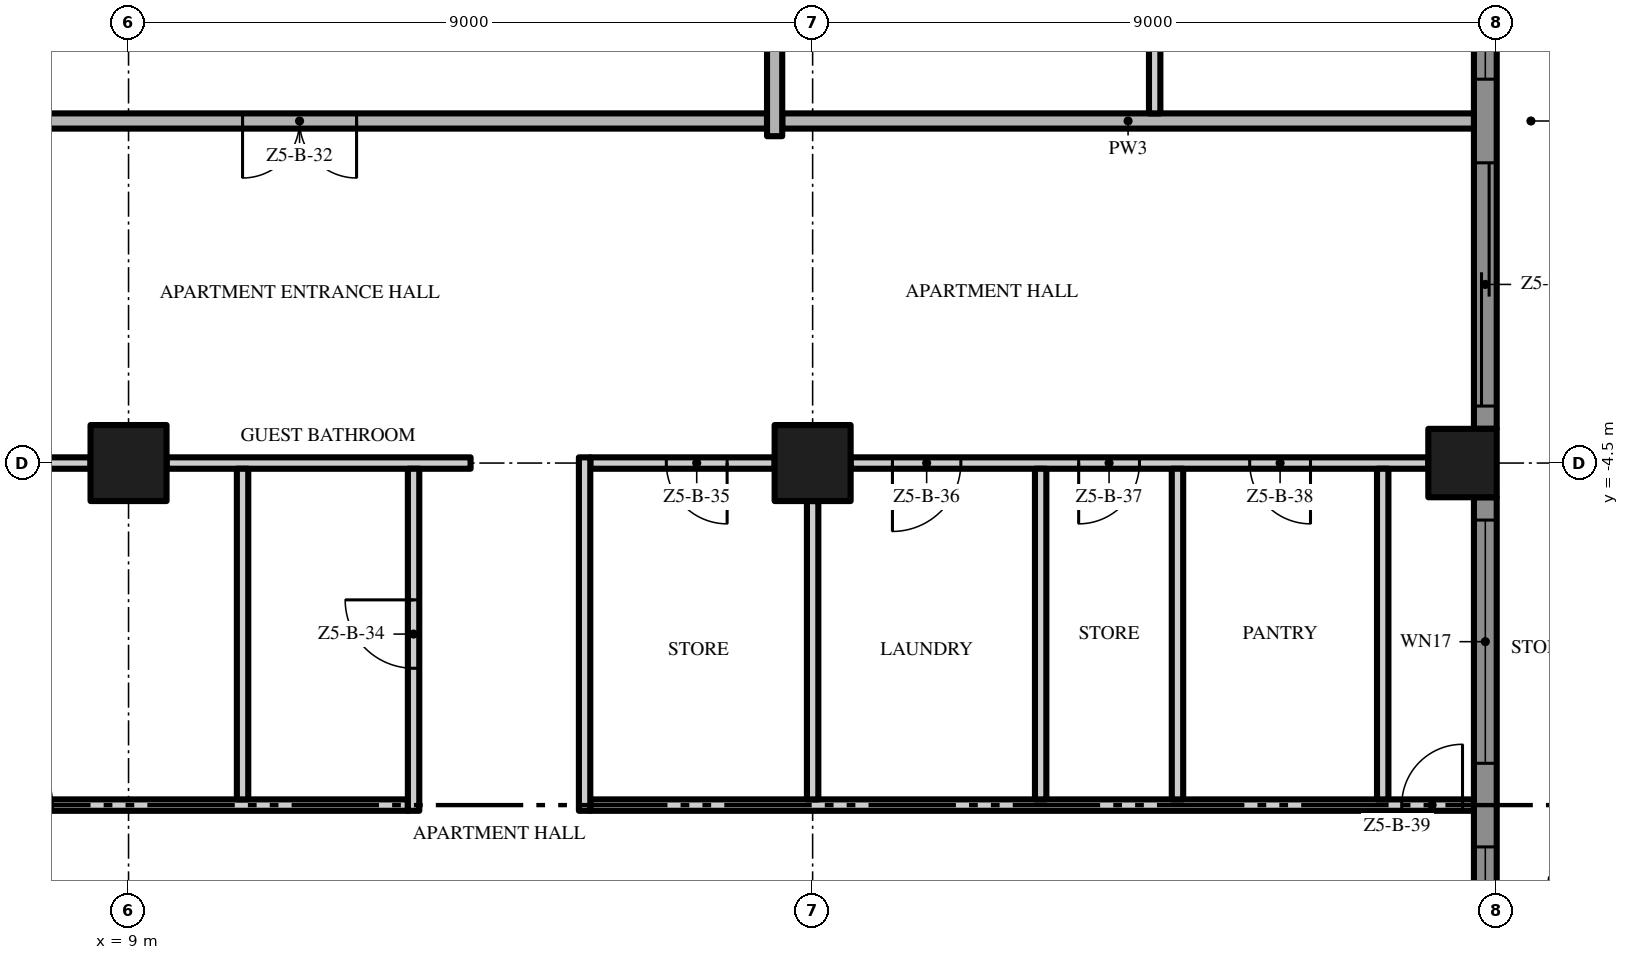
"""IFC4 building model, lengths in metres.
Left out: names, types, materials, properties, quantities, classifications, styles, units other than length and angle.
Written with IfcOpenShell. Run it as: python <this file> out.ifc"""

import sys

from ifc_helpers import new_model, si_unit, direction, frame, frame_2d, origin, origin_2d, place, context, subcontext, project, spatial, polyline, rectangle, outline, extrude, element, fill, save


model = new_model("IFC4")
c1 = context("Model", 3, precision=1e-05, world=origin(), true_north=direction((0.0, 1.0)))
c2 = subcontext(c1, "Body", "Model", "MODEL_VIEW")
j1 = project(units=[si_unit("LENGTHUNIT", "METRE"), si_unit("PLANEANGLEUNIT", "RADIAN")], contexts=[c1])
p1 = place(None, origin())
s1 = spatial("IfcSite", under=j1, at=p1, CompositionType="ELEMENT")
p2 = place(p1, origin())
s2 = spatial("IfcBuilding", under=s1, at=p2, CompositionType="ELEMENT")
p3 = place(p2, frame((0.0, 0.0, 250.2)))
s3 = spatial("IfcBuildingStorey", under=s2, at=p3, CompositionType="ELEMENT", Elevation=250.2)
p4 = place(p3, frame((18.0, -4.5, 0.0), z_axis=(0.0, 0.0, 1.0), x_axis=(1.0, 0.0, 0.0)))
e1 = element("IfcColumn", 1, at=p4, inside=s3, PredefinedType="COLUMN", context=c2, shape_type="SweptSolid", body=[
    extrude(rectangle(XDim=1.0, YDim=1.0, at=origin_2d()), origin(), (0.0, 0.0, 1.0), 3.5),
])
p5 = place(p3, frame((26.55, -4.5, 0.0), z_axis=(0.0, 0.0, 1.0), x_axis=(1.0, 0.0, 0.0)))
e2 = element("IfcColumn", 2, at=p5, inside=s3, PredefinedType="COLUMN", context=c2, shape_type="SweptSolid", body=[
    extrude(rectangle(XDim=0.9, YDim=0.9, at=origin_2d()), origin(), (0.0, 0.0, 1.0), 3.5),
])
p6 = place(p3, frame((9.0, -4.5, 0.0), z_axis=(0.0, 0.0, 1.0), x_axis=(1.0, 0.0, 0.0)))
e3 = element("IfcColumn", 3, at=p6, inside=s3, PredefinedType="COLUMN", context=c2, shape_type="SweptSolid", body=[
    extrude(rectangle(XDim=1.0, YDim=1.0, at=origin_2d()), origin(), (0.0, 0.0, 1.0), 3.5),
])
p7 = place(p3, frame((26.85, -4.95, 0.0), z_axis=(0.0, 0.0, 1.0), x_axis=(0.0, -1.0, 0.0)))
e4 = element("IfcWall", 4, at=p7, inside=s3, PredefinedType="SOLIDWALL", context=c2, shape_type="SweptSolid", body=[
    extrude(rectangle(XDim=8.1, YDim=0.3, at=frame_2d((4.05, 0.0))), origin(), (0.0, 0.0, 1.0), 3.5),
])
p8 = place(p7, frame((4.6, 0.0, 0.45)))
e5 = element("IfcOpeningElement", 5, at=p8, cuts=e4, PredefinedType="OPENING", context=c2, shape_type="SweptSolid", body=[
    extrude(rectangle(XDim=3.2, YDim=2.65, at=frame_2d((1.6, 1.325))), frame((0.0, 0.16, 0.0), z_axis=(0.0, -1.0, 0.0), x_axis=(1.0, 0.0, 0.0)), (0.0, 0.0, 1.0), 0.32),
])
p9 = place(p7, frame((0.3, 0.0, 0.45)))
e6 = element("IfcOpeningElement", 6, at=p9, cuts=e4, PredefinedType="OPENING", context=c2, shape_type="SweptSolid", body=[
    extrude(rectangle(XDim=3.2, YDim=2.65, at=frame_2d((1.6, 1.325))), frame((0.0, 0.16, 0.0), z_axis=(0.0, -1.0, 0.0), x_axis=(1.0, 0.0, 0.0)), (0.0, 0.0, 1.0), 0.32),
])
p10 = place(p3, frame((26.85, 4.05, 0.0), z_axis=(0.0, 0.0, 1.0), x_axis=(0.0, -1.0, 0.0)))
e7 = element("IfcWall", 7, at=p10, inside=s3, PredefinedType="SOLIDWALL", context=c2, shape_type="SweptSolid", body=[
    extrude(rectangle(XDim=8.1, YDim=0.3, at=frame_2d((4.05, 0.0))), origin(), (0.0, 0.0, 1.0), 3.5),
])
p11 = place(p10, frame((4.6, 0.0, 0.0)))
e8 = element("IfcOpeningElement", 8, at=p11, cuts=e7, PredefinedType="OPENING", context=c2, shape_type="SweptSolid", body=[
    extrude(rectangle(XDim=3.2, YDim=2.4, at=frame_2d((1.6, 1.2))), frame((0.0, 0.16, 0.0), z_axis=(0.0, -1.0, 0.0), x_axis=(1.0, 0.0, 0.0)), (0.0, 0.0, 1.0), 0.32),
])
p12 = place(p10, frame((0.3, 0.0, 0.45)))
e9 = element("IfcOpeningElement", 9, at=p12, cuts=e7, PredefinedType="OPENING", context=c2, shape_type="SweptSolid", body=[
    extrude(rectangle(XDim=3.2, YDim=2.65, at=frame_2d((1.6, 1.325))), frame((0.0, 0.16, 0.0), z_axis=(0.0, -1.0, 0.0), x_axis=(1.0, 0.0, 0.0)), (0.0, 0.0, 1.0), 0.32),
])
p13 = place(p3, origin())
e10 = element("IfcWall", 10, at=p13, inside=s3, PredefinedType="USERDEFINED", context=c2, shape_type="SweptSolid", body=[
    extrude(outline(polyline([(30.0, -18.0), (29.771, -16.5), (29.171, -15.0), (28.429, -13.5), (27.829, -12.0), (27.6, -10.5), (27.829, -9.0), (28.429, -7.5), (29.171, -6.0), (29.771, -4.5), (30.0, -3.0), (29.771, -1.5), (29.171, 0.0), (28.429, 1.5), (27.829, 3.0), (27.6, 4.5), (27.829, 6.0), (28.429, 7.5), (29.171, 9.0), (29.771, 10.5), (30.0, 12.0), (29.771, 13.5), (29.171, 15.0), (28.429, 16.5), (27.829, 18.0), (27.597, 17.907), (28.201, 16.398), (28.942, 14.898), (29.528, 13.434), (29.747, 12.0), (29.528, 10.566), (28.942, 9.102), (28.201, 7.602), (27.586, 6.066), (27.347, 4.5), (27.586, 2.934), (28.201, 1.398), (28.942, -0.102), (29.528, -1.566), (29.747, -3.0), (29.528, -4.434), (28.942, -5.898), (28.201, -7.398), (27.586, -8.934), (27.347, -10.5), (27.586, -12.066), (28.201, -13.602), (28.942, -15.102), (29.528, -16.566), (29.753, -18.038), (30.0, -18.0)])), origin(), (0.0, 0.0, 1.0), 0.9),
])
p14 = place(p3, frame((4.6, -9.0, 0.0), z_axis=(0.0, 0.0, 1.0), x_axis=(1.0, 0.0, 0.0)))
e11 = element("IfcWall", 11, at=p14, inside=s3, PredefinedType="PARTITIONING", context=c2, shape_type="SweptSolid", body=[
    extrude(rectangle(XDim=8.075, YDim=0.15, at=frame_2d((4.037, 0.0))), origin(), (0.0, 0.0, 1.0), 3.5),
])
p15 = place(p14, frame((2.4, 0.0, 0.0)))
e12 = element("IfcOpeningElement", 12, at=p15, cuts=e11, PredefinedType="OPENING", context=c2, shape_type="SweptSolid", body=[
    extrude(rectangle(XDim=1.0, YDim=2.4, at=frame_2d((0.5, 1.2))), frame((0.0, 0.085, 0.0), z_axis=(0.0, -1.0, 0.0), x_axis=(1.0, 0.0, 0.0)), (0.0, 0.0, 1.0), 0.17),
])
p16 = place(p3, frame((15.075, -9.0, 0.0), z_axis=(0.0, 0.0, 1.0), x_axis=(1.0, 0.0, 0.0)))
e13 = element("IfcWall", 13, at=p16, inside=s3, PredefinedType="PARTITIONING", context=c2, shape_type="SweptSolid", body=[
    extrude(rectangle(XDim=11.625, YDim=0.15, at=frame_2d((5.812, 0.0))), origin(), (0.0, 0.0, 1.0), 3.5),
])
p17 = place(p16, frame((10.675, 0.0, 0.0)))
e14 = element("IfcOpeningElement", 14, at=p17, cuts=e13, PredefinedType="OPENING", context=c2, shape_type="SweptSolid", body=[
    extrude(rectangle(XDim=0.8, YDim=2.0, at=frame_2d((0.4, 1.0))), frame((0.0, 0.085, 0.0), z_axis=(0.0, -1.0, 0.0), x_axis=(1.0, 0.0, 0.0)), (0.0, 0.0, 1.0), 0.17),
])
p18 = place(p3, frame((4.6, -4.5, 0.0), z_axis=(0.0, 0.0, 1.0), x_axis=(1.0, 0.0, 0.0)))
e15 = element("IfcWall", 15, at=p18, inside=s3, PredefinedType="PARTITIONING", context=c2, shape_type="SweptSolid", body=[
    extrude(rectangle(XDim=3.9, YDim=0.15, at=frame_2d((1.95, 0.0))), origin(), (0.0, 0.0, 1.0), 3.5),
])
p19 = place(p3, frame((9.5, -4.5, 0.0), z_axis=(0.0, 0.0, 1.0), x_axis=(1.0, 0.0, 0.0)))
e16 = element("IfcWall", 16, at=p19, inside=s3, PredefinedType="PARTITIONING", context=c2, shape_type="SweptSolid", body=[
    extrude(rectangle(XDim=4.0, YDim=0.15, at=frame_2d((2.0, 0.0))), origin(), (0.0, 0.0, 1.0), 3.5),
])
p20 = place(p3, frame((17.5, -4.5, 0.0), z_axis=(0.0, 0.0, 1.0), x_axis=(-1.0, 0.0, 0.0)))
e17 = element("IfcWall", 17, at=p20, inside=s3, PredefinedType="PARTITIONING", context=c2, shape_type="SweptSolid", body=[
    extrude(rectangle(XDim=2.425, YDim=0.15, at=frame_2d((1.212, 0.0))), origin(), (0.0, 0.0, 1.0), 3.5),
])
p21 = place(p20, frame((0.625, 0.0, 0.0)))
e18 = element("IfcOpeningElement", 18, at=p21, cuts=e17, PredefinedType="OPENING", context=c2, shape_type="SweptSolid", body=[
    extrude(rectangle(XDim=0.8, YDim=2.0, at=frame_2d((0.4, 1.0))), frame((0.0, 0.085, 0.0), z_axis=(0.0, -1.0, 0.0), x_axis=(1.0, 0.0, 0.0)), (0.0, 0.0, 1.0), 0.17),
])
p22 = place(p3, frame((26.1, -4.5, 0.0), z_axis=(0.0, 0.0, 1.0), x_axis=(-1.0, 0.0, 0.0)))
e19 = element("IfcWall", 19, at=p22, inside=s3, PredefinedType="PARTITIONING", context=c2, shape_type="SweptSolid", body=[
    extrude(rectangle(XDim=7.6, YDim=0.15, at=frame_2d((3.8, 0.0))), origin(), (0.0, 0.0, 1.0), 3.5),
])
p23 = place(p22, frame((6.15, 0.0, 0.0)))
e20 = element("IfcOpeningElement", 20, at=p23, cuts=e19, PredefinedType="OPENING", context=c2, shape_type="SweptSolid", body=[
    extrude(rectangle(XDim=0.9, YDim=2.1, at=frame_2d((0.45, 1.05))), frame((0.0, 0.085, 0.0), z_axis=(0.0, -1.0, 0.0), x_axis=(1.0, 0.0, 0.0)), (0.0, 0.0, 1.0), 0.17),
])
p24 = place(p22, frame((3.8, 0.0, 0.0)))
e21 = element("IfcOpeningElement", 21, at=p24, cuts=e19, PredefinedType="OPENING", context=c2, shape_type="SweptSolid", body=[
    extrude(rectangle(XDim=0.8, YDim=2.0, at=frame_2d((0.4, 1.0))), frame((0.0, 0.085, 0.0), z_axis=(0.0, -1.0, 0.0), x_axis=(1.0, 0.0, 0.0)), (0.0, 0.0, 1.0), 0.17),
])
p25 = place(p22, frame((1.55, 0.0, 0.0)))
e22 = element("IfcOpeningElement", 22, at=p25, cuts=e19, PredefinedType="OPENING", context=c2, shape_type="SweptSolid", body=[
    extrude(rectangle(XDim=0.8, YDim=2.0, at=frame_2d((0.4, 1.0))), frame((0.0, 0.085, 0.0), z_axis=(0.0, -1.0, 0.0), x_axis=(1.0, 0.0, 0.0)), (0.0, 0.0, 1.0), 0.17),
])
p26 = place(p3, frame((17.4, 0.0, 0.0), z_axis=(0.0, 0.0, 1.0), x_axis=(-1.0, 0.0, 0.0)))
e23 = element("IfcWall", 23, at=p26, inside=s3, PredefinedType="PARTITIONING", context=c2, shape_type="SweptSolid", body=[
    extrude(rectangle(XDim=34.8, YDim=0.2, at=frame_2d((17.4, 0.0))), origin(), (0.0, 0.0, 1.0), 3.5),
])
p27 = place(p26, frame((23.4, 0.0, 0.0)))
e24 = element("IfcOpeningElement", 24, at=p27, cuts=e23, PredefinedType="OPENING", context=c2, shape_type="SweptSolid", body=[
    extrude(rectangle(XDim=1.5, YDim=2.4, at=frame_2d((0.75, 1.2))), frame((0.0, 0.11, 0.0), z_axis=(0.0, -1.0, 0.0), x_axis=(1.0, 0.0, 0.0)), (0.0, 0.0, 1.0), 0.22),
])
p28 = place(p26, frame((5.4, 0.0, 0.0)))
e25 = element("IfcOpeningElement", 25, at=p28, cuts=e23, PredefinedType="OPENING", context=c2, shape_type="SweptSolid", body=[
    extrude(rectangle(XDim=1.5, YDim=2.4, at=frame_2d((0.75, 1.2))), frame((0.0, 0.11, 0.0), z_axis=(0.0, -1.0, 0.0), x_axis=(1.0, 0.0, 0.0)), (0.0, 0.0, 1.0), 0.22),
])
p29 = place(p3, frame((17.6, 0.0, 0.0), z_axis=(0.0, 0.0, 1.0), x_axis=(1.0, 0.0, 0.0)))
e26 = element("IfcWall", 26, at=p29, inside=s3, PredefinedType="PARTITIONING", context=c2, shape_type="SweptSolid", body=[
    extrude(rectangle(XDim=9.1, YDim=0.2, at=frame_2d((4.55, 0.0))), origin(), (0.0, 0.0, 1.0), 3.5),
])
p30 = place(p3, frame((10.5, -8.925, 0.0), z_axis=(0.0, 0.0, 1.0), x_axis=(0.0, 1.0, 0.0)))
e27 = element("IfcWall", 27, at=p30, inside=s3, PredefinedType="PARTITIONING", context=c2, shape_type="SweptSolid", body=[
    extrude(rectangle(XDim=4.35, YDim=0.15, at=frame_2d((2.175, 0.0))), origin(), (0.0, 0.0, 1.0), 3.5),
])
p31 = place(p3, frame((12.75, -9.075, 0.0), z_axis=(0.0, 0.0, 1.0), x_axis=(0.0, 1.0, 0.0)))
e28 = element("IfcWall", 28, at=p31, inside=s3, PredefinedType="PARTITIONING", context=c2, shape_type="SweptSolid", body=[
    extrude(rectangle(XDim=4.5, YDim=0.15, at=frame_2d((2.25, 0.0))), origin(), (0.0, 0.0, 1.0), 3.5),
])
p32 = place(p31, frame((1.875, 0.0, 0.0)))
e29 = element("IfcOpeningElement", 29, at=p32, cuts=e28, PredefinedType="OPENING", context=c2, shape_type="SweptSolid", body=[
    extrude(rectangle(XDim=0.9, YDim=2.1, at=frame_2d((0.45, 1.05))), frame((0.0, 0.085, 0.0), z_axis=(0.0, -1.0, 0.0), x_axis=(1.0, 0.0, 0.0)), (0.0, 0.0, 1.0), 0.17),
])
p33 = place(p3, frame((15.0, -9.075, 0.0), z_axis=(0.0, 0.0, 1.0), x_axis=(0.0, 1.0, 0.0)))
e30 = element("IfcWall", 30, at=p33, inside=s3, PredefinedType="PARTITIONING", context=c2, shape_type="SweptSolid", body=[
    extrude(rectangle(XDim=4.65, YDim=0.15, at=frame_2d((2.325, 0.0))), origin(), (0.0, 0.0, 1.0), 3.5),
])
p34 = place(p3, frame((17.5, -0.2, 0.0), z_axis=(0.0, 0.0, 1.0), x_axis=(0.0, 1.0, 0.0)))
e31 = element("IfcWall", 31, at=p34, inside=s3, PredefinedType="PARTITIONING", context=c2, shape_type="SweptSolid", body=[
    extrude(rectangle(XDim=4.2, YDim=0.2, at=frame_2d((2.1, 0.0))), origin(), (0.0, 0.0, 1.0), 3.5),
])
p35 = place(p3, frame((18.0, -8.925, 0.0), z_axis=(0.0, 0.0, 1.0), x_axis=(0.0, 1.0, 0.0)))
e32 = element("IfcWall", 32, at=p35, inside=s3, PredefinedType="PARTITIONING", context=c2, shape_type="SweptSolid", body=[
    extrude(rectangle(XDim=3.925, YDim=0.15, at=frame_2d((1.962, 0.0))), origin(), (0.0, 0.0, 1.0), 3.5),
])
p36 = place(p3, frame((21.0, -8.925, 0.0), z_axis=(0.0, 0.0, 1.0), x_axis=(0.0, 1.0, 0.0)))
e33 = element("IfcWall", 33, at=p36, inside=s3, PredefinedType="PARTITIONING", context=c2, shape_type="SweptSolid", body=[
    extrude(rectangle(XDim=4.35, YDim=0.15, at=frame_2d((2.175, 0.0))), origin(), (0.0, 0.0, 1.0), 3.5),
])
p37 = place(p3, frame((22.5, 17.55, 0.0), z_axis=(0.0, 0.0, 1.0), x_axis=(0.0, -1.0, 0.0)))
e34 = element("IfcWall", 34, at=p37, inside=s3, PredefinedType="PARTITIONING", context=c2, shape_type="SweptSolid", body=[
    extrude(rectangle(XDim=17.45, YDim=0.15, at=frame_2d((8.725, 0.0))), origin(), (0.0, 0.0, 1.0), 3.5),
])
p38 = place(p37, frame((14.8, 0.0, 0.0)))
e35 = element("IfcOpeningElement", 35, at=p38, cuts=e34, PredefinedType="OPENING", context=c2, shape_type="SweptSolid", body=[
    extrude(rectangle(XDim=1.0, YDim=2.4, at=frame_2d((0.5, 1.2))), frame((0.0, 0.085, 0.0), z_axis=(0.0, -1.0, 0.0), x_axis=(1.0, 0.0, 0.0)), (0.0, 0.0, 1.0), 0.17),
])
p39 = place(p37, frame((7.65, 0.0, 0.0)))
e36 = element("IfcOpeningElement", 36, at=p39, cuts=e34, PredefinedType="OPENING", context=c2, shape_type="SweptSolid", body=[
    extrude(rectangle(XDim=1.8, YDim=2.4, at=frame_2d((0.9, 1.2))), frame((0.0, 0.085, 0.0), z_axis=(0.0, -1.0, 0.0), x_axis=(1.0, 0.0, 0.0)), (0.0, 0.0, 1.0), 0.17),
])
for number, where, z_axis, x_axis in (
    (37, (22.8, -8.925, 0.0), (0.0, 0.0, 1.0), (0.0, 1.0, 0.0)),
    (38, (25.5, -8.925, 0.0), (0.0, 0.0, 1.0), (0.0, 1.0, 0.0)),
):
    element("IfcWall", number, at=place(p3, frame(where, z_axis=z_axis, x_axis=x_axis)), inside=s3, PredefinedType="PARTITIONING", context=c2, shape_type="SweptSolid", body=[
        extrude(rectangle(XDim=4.35, YDim=0.15, at=frame_2d((2.175, 0.0))), origin(), (0.0, 0.0, 1.0), 3.5),
    ])
p40 = place(p8, origin())
e39 = element("IfcWindow", 39, at=p40, inside=s3, PartitioningType="SINGLE_PANEL", PredefinedType="WINDOW", context=c2, shape_type="SweptSolid", body=[
    extrude(rectangle(XDim=3.2, YDim=2.65, at=frame_2d((1.6, 1.325))), frame((0.0, 0.03, 0.0), z_axis=(0.0, -1.0, 0.0), x_axis=(1.0, 0.0, 0.0)), (0.0, 0.0, 1.0), 0.06),
])
fill(e5, e39)
p41 = place(p9, origin())
e40 = element("IfcWindow", 40, at=p41, inside=s3, PartitioningType="SINGLE_PANEL", PredefinedType="WINDOW", context=c2, shape_type="SweptSolid", body=[
    extrude(rectangle(XDim=3.2, YDim=2.65, at=frame_2d((1.6, 1.325))), frame((0.0, 0.03, 0.0), z_axis=(0.0, -1.0, 0.0), x_axis=(1.0, 0.0, 0.0)), (0.0, 0.0, 1.0), 0.06),
])
fill(e6, e40)
p42 = place(p11, origin())
e41 = element("IfcDoor", 41, at=p42, inside=s3, OperationType="SINGLE_SWING_LEFT", PredefinedType="DOOR", context=c2, shape_type="SweptSolid", body=[
    extrude(rectangle(XDim=3.2, YDim=2.4, at=frame_2d((1.6, 1.2))), frame((0.0, 0.025, 0.0), z_axis=(0.0, -1.0, 0.0), x_axis=(1.0, 0.0, 0.0)), (0.0, 0.0, 1.0), 0.05),
])
fill(e8, e41)
p43 = place(p12, origin())
e42 = element("IfcWindow", 42, at=p43, inside=s3, PartitioningType="SINGLE_PANEL", PredefinedType="WINDOW", context=c2, shape_type="SweptSolid", body=[
    extrude(rectangle(XDim=3.2, YDim=2.65, at=frame_2d((1.6, 1.325))), frame((0.0, 0.03, 0.0), z_axis=(0.0, -1.0, 0.0), x_axis=(1.0, 0.0, 0.0)), (0.0, 0.0, 1.0), 0.06),
])
fill(e9, e42)
p44 = place(p28, origin())
e43 = element("IfcDoor", 43, at=p44, inside=s3, OperationType="DOUBLE_DOOR_SINGLE_SWING", PredefinedType="DOOR", context=c2, shape_type="SweptSolid", body=[
    extrude(rectangle(XDim=1.5, YDim=2.4, at=frame_2d((0.75, 1.2))), frame((0.0, 0.025, 0.0), z_axis=(0.0, -1.0, 0.0), x_axis=(1.0, 0.0, 0.0)), (0.0, 0.0, 1.0), 0.05),
])
fill(e25, e43)
p45 = place(p32, origin())
e44 = element("IfcDoor", 44, at=p45, inside=s3, OperationType="SINGLE_SWING_RIGHT", PredefinedType="DOOR", context=c2, shape_type="SweptSolid", body=[
    extrude(rectangle(XDim=0.9, YDim=2.1, at=frame_2d((0.45, 1.05))), frame((0.0, 0.025, 0.0), z_axis=(0.0, -1.0, 0.0), x_axis=(1.0, 0.0, 0.0)), (0.0, 0.0, 1.0), 0.05),
])
fill(e29, e44)
p46 = place(p21, origin())
e45 = element("IfcDoor", 45, at=p46, inside=s3, OperationType="SINGLE_SWING_LEFT", PredefinedType="DOOR", context=c2, shape_type="SweptSolid", body=[
    extrude(rectangle(XDim=0.8, YDim=2.0, at=frame_2d((0.4, 1.0))), frame((0.0, 0.025, 0.0), z_axis=(0.0, -1.0, 0.0), x_axis=(1.0, 0.0, 0.0)), (0.0, 0.0, 1.0), 0.05),
])
fill(e18, e45)
p47 = place(p23, origin())
e46 = element("IfcDoor", 46, at=p47, inside=s3, OperationType="SINGLE_SWING_RIGHT", PredefinedType="DOOR", context=c2, shape_type="SweptSolid", body=[
    extrude(rectangle(XDim=0.9, YDim=2.1, at=frame_2d((0.45, 1.05))), frame((0.0, 0.025, 0.0), z_axis=(0.0, -1.0, 0.0), x_axis=(1.0, 0.0, 0.0)), (0.0, 0.0, 1.0), 0.05),
])
fill(e20, e46)
p48 = place(p24, origin())
e47 = element("IfcDoor", 47, at=p48, inside=s3, OperationType="SINGLE_SWING_RIGHT", PredefinedType="DOOR", context=c2, shape_type="SweptSolid", body=[
    extrude(rectangle(XDim=0.8, YDim=2.0, at=frame_2d((0.4, 1.0))), frame((0.0, 0.025, 0.0), z_axis=(0.0, -1.0, 0.0), x_axis=(1.0, 0.0, 0.0)), (0.0, 0.0, 1.0), 0.05),
])
fill(e21, e47)
p49 = place(p25, origin())
e48 = element("IfcDoor", 48, at=p49, inside=s3, OperationType="SINGLE_SWING_LEFT", PredefinedType="DOOR", context=c2, shape_type="SweptSolid", body=[
    extrude(rectangle(XDim=0.8, YDim=2.0, at=frame_2d((0.4, 1.0))), frame((0.0, 0.025, 0.0), z_axis=(0.0, -1.0, 0.0), x_axis=(1.0, 0.0, 0.0)), (0.0, 0.0, 1.0), 0.05),
])
fill(e22, e48)
p50 = place(p17, origin())
e49 = element("IfcDoor", 49, at=p50, inside=s3, OperationType="SINGLE_SWING_RIGHT", PredefinedType="DOOR", context=c2, shape_type="SweptSolid", body=[
    extrude(rectangle(XDim=0.8, YDim=2.0, at=frame_2d((0.4, 1.0))), frame((0.0, 0.025, 0.0), z_axis=(0.0, -1.0, 0.0), x_axis=(1.0, 0.0, 0.0)), (0.0, 0.0, 1.0), 0.05),
])
fill(e14, e49)
save(model, sys.argv[1])
